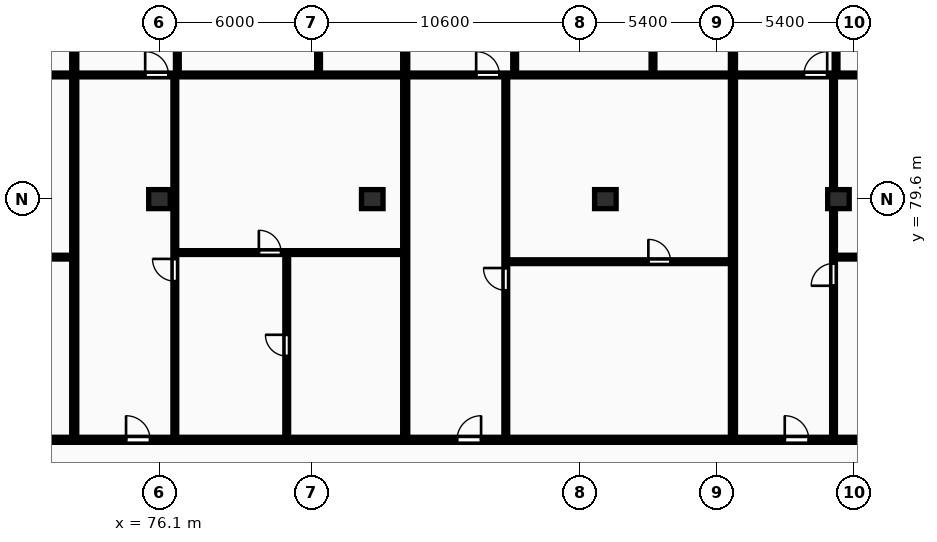
"""IFC4 building model, lengths in metres.
Left out: names, types, materials, properties, quantities, classifications, styles, units other than length and angle.
Written with IfcOpenShell. Run it as: python <this file> out.ifc"""

import sys

from ifc_helpers import new_model, si_unit, direction, frame, frame_2d, origin, origin_2d, place, context, subcontext, project, spatial, rectangle, extrude, element, fill, save


model = new_model("IFC4")
c1 = context("Model", 3, precision=1e-05, world=origin(), true_north=direction((0.0, 1.0)))
c2 = subcontext(c1, "Body", "Model", "MODEL_VIEW")
j1 = project(units=[si_unit("LENGTHUNIT", "METRE"), si_unit("PLANEANGLEUNIT", "RADIAN")], contexts=[c1])
p1 = place(None, origin())
s1 = spatial("IfcSite", under=j1, at=p1, CompositionType="ELEMENT")
p2 = place(p1, origin())
s2 = spatial("IfcBuilding", under=s1, at=p2, CompositionType="ELEMENT")
p3 = place(p2, frame((0.0, 0.0, 210.85)))
s3 = spatial("IfcBuildingStorey", under=s2, at=p3, CompositionType="ELEMENT", Elevation=210.85)
for number, where, z_axis, x_axis in (
    (1, (76.1, 79.6, 0.0), (0.0, 0.0, 1.0), (1.0, 0.0, 0.0)),
    (2, (84.5, 79.6, 0.0), (0.0, 0.0, 1.0), (1.0, 0.0, 0.0)),
    (3, (93.7, 79.6, 0.0), (0.0, 0.0, 1.0), (1.0, 0.0, 0.0)),
    (4, (102.9, 79.6, 0.0), (0.0, 0.0, 1.0), (1.0, 0.0, 0.0)),
):
    element("IfcColumn", number, at=place(p3, frame(where, z_axis=z_axis, x_axis=x_axis)), inside=s3, PredefinedType="COLUMN", context=c2, shape_type="SweptSolid", body=[
        extrude(rectangle(XDim=0.85, YDim=0.75, at=origin_2d()), origin(), (0.0, 0.0, 1.0), 3.25),
    ])
p4 = place(p3, frame((72.736, 70.18, 0.0), z_axis=(0.0, 0.0, 1.0), x_axis=(0.0, 1.0, 0.0)))
e5 = element("IfcWall", 5, at=p4, inside=s3, PredefinedType="PARTITIONING", context=c2, shape_type="SweptSolid", body=[
    extrude(rectangle(XDim=24.32, YDim=0.2, at=frame_2d((12.16, 0.0))), origin(), (0.0, 0.0, 1.0), 2.97),
])
p5 = place(p3, frame((63.83, 77.31, 0.0), z_axis=(0.0, 0.0, 1.0), x_axis=(1.0, 0.0, 0.0)))
e6 = element("IfcWall", 6, at=p5, inside=s3, PredefinedType="PARTITIONING", context=c2, shape_type="SweptSolid", body=[
    extrude(rectangle(XDim=8.826, YDim=0.15, at=frame_2d((4.413, 0.0))), origin(), (0.0, 0.0, 1.0), 2.97),
])
p6 = place(p5, frame((5.857, 0.0, 0.0)))
e7 = element("IfcOpeningElement", 7, at=p6, cuts=e6, PredefinedType="OPENING", context=c2, shape_type="SweptSolid", body=[
    extrude(rectangle(XDim=0.88, YDim=2.06, at=frame_2d((0.44, 1.03))), frame((0.0, 0.085, 0.0), z_axis=(0.0, -1.0, 0.0), x_axis=(1.0, 0.0, 0.0)), (0.0, 0.0, 1.0), 0.17),
])
p7 = place(p3, frame((59.88, 84.5, 0.0), z_axis=(0.0, 0.0, 1.0), x_axis=(1.0, 0.0, 0.0)))
e8 = element("IfcWall", 8, at=p7, inside=s3, PredefinedType="PARTITIONING", context=c2, shape_type="SweptSolid", body=[
    extrude(rectangle(XDim=12.776, YDim=0.15, at=frame_2d((6.388, 0.0))), origin(), (0.0, 0.0, 1.0), 2.97),
])
p8 = place(p7, frame((2.72, 0.0, 0.0)))
e9 = element("IfcOpeningElement", 9, at=p8, cuts=e8, PredefinedType="OPENING", context=c2, shape_type="SweptSolid", body=[
    extrude(rectangle(XDim=0.92, YDim=2.08, at=frame_2d((0.46, 1.04))), frame((0.0, 0.085, 0.0), z_axis=(0.0, -1.0, 0.0), x_axis=(1.0, 0.0, 0.0)), (0.0, 0.0, 1.0), 0.17),
])
p9 = place(p3, frame((85.8, 70.18, 0.0), z_axis=(0.0, 0.0, 1.0), x_axis=(0.0, 1.0, 0.0)))
e10 = element("IfcWall", 10, at=p9, inside=s3, PredefinedType="PARTITIONING", context=c2, shape_type="SweptSolid", body=[
    extrude(rectangle(XDim=24.32, YDim=0.2, at=frame_2d((12.16, 0.0))), origin(), (0.0, 0.0, 1.0), 2.97),
])
p10 = place(p3, frame((81.123, 70.16, 0.0), z_axis=(0.0, 0.0, 1.0), x_axis=(0.0, 1.0, 0.0)))
e11 = element("IfcWall", 11, at=p10, inside=s3, PredefinedType="PARTITIONING", context=c2, shape_type="SweptSolid", body=[
    extrude(rectangle(XDim=7.33, YDim=0.15, at=frame_2d((3.665, 0.0))), origin(), (0.0, 0.0, 1.0), 2.97),
])
p11 = place(p10, frame((3.245, 0.0, 0.0)))
e12 = element("IfcOpeningElement", 12, at=p11, cuts=e11, PredefinedType="OPENING", context=c2, shape_type="SweptSolid", body=[
    extrude(rectangle(XDim=0.84, YDim=2.04, at=frame_2d((0.42, 1.02))), frame((0.0, 0.085, 0.0), z_axis=(0.0, -1.0, 0.0), x_axis=(1.0, 0.0, 0.0)), (0.0, 0.0, 1.0), 0.17),
])
p12 = place(p3, frame((76.766, 77.49, 0.0), z_axis=(0.0, 0.0, 1.0), x_axis=(1.0, 0.0, 0.0)))
e13 = element("IfcWall", 13, at=p12, inside=s3, PredefinedType="PARTITIONING", context=c2, shape_type="SweptSolid", body=[
    extrude(rectangle(XDim=8.954, YDim=0.15, at=frame_2d((4.477, 0.0))), origin(), (0.0, 0.0, 1.0), 2.97),
])
p13 = place(p12, frame((3.257, 0.0, 0.0)))
e14 = element("IfcOpeningElement", 14, at=p13, cuts=e13, PredefinedType="OPENING", context=c2, shape_type="SweptSolid", body=[
    extrude(rectangle(XDim=0.88, YDim=2.06, at=frame_2d((0.44, 1.03))), frame((0.0, 0.085, 0.0), z_axis=(0.0, -1.0, 0.0), x_axis=(1.0, 0.0, 0.0)), (0.0, 0.0, 1.0), 0.17),
])
p14 = place(p3, frame((76.706, 70.16, 0.0), z_axis=(0.0, 0.0, 1.0), x_axis=(0.0, 1.0, 0.0)))
e15 = element("IfcWall", 15, at=p14, inside=s3, PredefinedType="PARTITIONING", context=c2, shape_type="SweptSolid", body=[
    extrude(rectangle(XDim=14.3, YDim=0.15, at=frame_2d((7.15, 0.0))), origin(), (0.0, 0.0, 1.0), 2.97),
])
p15 = place(p14, frame((6.2, 0.0, 0.0)))
e16 = element("IfcOpeningElement", 16, at=p15, cuts=e15, PredefinedType="OPENING", context=c2, shape_type="SweptSolid", body=[
    extrude(rectangle(XDim=0.88, YDim=2.06, at=frame_2d((0.44, 1.03))), frame((0.0, 0.085, 0.0), z_axis=(0.0, -1.0, 0.0), x_axis=(1.0, 0.0, 0.0)), (0.0, 0.0, 1.0), 0.17),
])
p16 = place(p3, frame((76.806, 84.54, 0.0), z_axis=(0.0, 0.0, 1.0), x_axis=(0.0, 1.0, 0.0)))
e17 = element("IfcWall", 17, at=p16, inside=s3, PredefinedType="PARTITIONING", context=c2, shape_type="SweptSolid", body=[
    extrude(rectangle(XDim=5.0, YDim=0.15, at=frame_2d((2.5, 0.0))), origin(), (0.0, 0.0, 1.0), 2.97),
])
p17 = place(p16, frame((2.06, 0.0, 0.0)))
e18 = element("IfcOpeningElement", 18, at=p17, cuts=e17, PredefinedType="OPENING", context=c2, shape_type="SweptSolid", body=[
    extrude(rectangle(XDim=0.88, YDim=2.06, at=frame_2d((0.44, 1.03))), frame((0.0, 0.085, 0.0), z_axis=(0.0, -1.0, 0.0), x_axis=(1.0, 0.0, 0.0)), (0.0, 0.0, 1.0), 0.17),
])
p18 = place(p3, frame((82.38, 84.54, 0.0), z_axis=(0.0, 0.0, 1.0), x_axis=(0.0, 1.0, 0.0)))
e19 = element("IfcWall", 19, at=p18, inside=s3, PredefinedType="PARTITIONING", context=c2, shape_type="SweptSolid", body=[
    extrude(rectangle(XDim=9.96, YDim=0.15, at=frame_2d((4.98, 0.0))), origin(), (0.0, 0.0, 1.0), 2.97),
])
p19 = place(p18, frame((1.43, 0.0, 0.0)))
e20 = element("IfcOpeningElement", 20, at=p19, cuts=e19, PredefinedType="OPENING", context=c2, shape_type="SweptSolid", body=[
    extrude(rectangle(XDim=0.84, YDim=2.04, at=frame_2d((0.42, 1.02))), frame((0.0, 0.085, 0.0), z_axis=(0.0, -1.0, 0.0), x_axis=(1.0, 0.0, 0.0)), (0.0, 0.0, 1.0), 0.17),
])
p20 = place(p18, frame((3.92, 0.0, 0.0)))
e21 = element("IfcOpeningElement", 21, at=p20, cuts=e19, PredefinedType="OPENING", context=c2, shape_type="SweptSolid", body=[
    extrude(rectangle(XDim=0.84, YDim=2.04, at=frame_2d((0.42, 1.02))), frame((0.0, 0.085, 0.0), z_axis=(0.0, -1.0, 0.0), x_axis=(1.0, 0.0, 0.0)), (0.0, 0.0, 1.0), 0.17),
])
p21 = place(p18, frame((8.297, 0.0, 0.0)))
e22 = element("IfcOpeningElement", 22, at=p21, cuts=e19, PredefinedType="OPENING", context=c2, shape_type="SweptSolid", body=[
    extrude(rectangle(XDim=0.88, YDim=2.06, at=frame_2d((0.44, 1.03))), frame((0.0, 0.085, 0.0), z_axis=(0.0, -1.0, 0.0), x_axis=(1.0, 0.0, 0.0)), (0.0, 0.0, 1.0), 0.17),
])
p22 = place(p3, frame((72.816, 84.5, 0.0), z_axis=(0.0, 0.0, 1.0), x_axis=(1.0, 0.0, 0.0)))
e23 = element("IfcWall", 23, at=p22, inside=s3, PredefinedType="PARTITIONING", context=c2, shape_type="SweptSolid", body=[
    extrude(rectangle(XDim=12.904, YDim=0.15, at=frame_2d((6.452, 0.0))), origin(), (0.0, 0.0, 1.0), 2.97),
])
p23 = place(p22, frame((2.72, 0.0, 0.0)))
e24 = element("IfcOpeningElement", 24, at=p23, cuts=e23, PredefinedType="OPENING", context=c2, shape_type="SweptSolid", body=[
    extrude(rectangle(XDim=0.92, YDim=2.08, at=frame_2d((0.46, 1.04))), frame((0.0, 0.085, 0.0), z_axis=(0.0, -1.0, 0.0), x_axis=(1.0, 0.0, 0.0)), (0.0, 0.0, 1.0), 0.17),
])
p24 = place(p3, frame((98.736, 70.18, 0.0), z_axis=(0.0, 0.0, 1.0), x_axis=(0.0, 1.0, 0.0)))
e25 = element("IfcWall", 25, at=p24, inside=s3, PredefinedType="PARTITIONING", context=c2, shape_type="SweptSolid", body=[
    extrude(rectangle(XDim=24.32, YDim=0.2, at=frame_2d((12.16, 0.0))), origin(), (0.0, 0.0, 1.0), 2.97),
])
p25 = place(p3, frame((89.83, 77.13, 0.0), z_axis=(0.0, 0.0, 1.0), x_axis=(1.0, 0.0, 0.0)))
e26 = element("IfcWall", 26, at=p25, inside=s3, PredefinedType="PARTITIONING", context=c2, shape_type="SweptSolid", body=[
    extrude(rectangle(XDim=8.826, YDim=0.15, at=frame_2d((4.413, 0.0))), origin(), (0.0, 0.0, 1.0), 2.97),
])
p26 = place(p25, frame((5.567, 0.0, 0.0)))
e27 = element("IfcOpeningElement", 27, at=p26, cuts=e26, PredefinedType="OPENING", context=c2, shape_type="SweptSolid", body=[
    extrude(rectangle(XDim=0.88, YDim=2.06, at=frame_2d((0.44, 1.03))), frame((0.0, 0.085, 0.0), z_axis=(0.0, -1.0, 0.0), x_axis=(1.0, 0.0, 0.0)), (0.0, 0.0, 1.0), 0.17),
])
p27 = place(p3, frame((89.77, 70.16, 0.0), z_axis=(0.0, 0.0, 1.0), x_axis=(0.0, 1.0, 0.0)))
e28 = element("IfcWall", 28, at=p27, inside=s3, PredefinedType="PARTITIONING", context=c2, shape_type="SweptSolid", body=[
    extrude(rectangle(XDim=14.3, YDim=0.15, at=frame_2d((7.15, 0.0))), origin(), (0.0, 0.0, 1.0), 2.97),
])
p28 = place(p27, frame((5.84, 0.0, 0.0)))
e29 = element("IfcOpeningElement", 29, at=p28, cuts=e28, PredefinedType="OPENING", context=c2, shape_type="SweptSolid", body=[
    extrude(rectangle(XDim=0.88, YDim=2.06, at=frame_2d((0.44, 1.03))), frame((0.0, 0.085, 0.0), z_axis=(0.0, -1.0, 0.0), x_axis=(1.0, 0.0, 0.0)), (0.0, 0.0, 1.0), 0.17),
])
p29 = place(p3, frame((90.12, 84.54, 0.0), z_axis=(0.0, 0.0, 1.0), x_axis=(0.0, 1.0, 0.0)))
e30 = element("IfcWall", 30, at=p29, inside=s3, PredefinedType="PARTITIONING", context=c2, shape_type="SweptSolid", body=[
    extrude(rectangle(XDim=5.0, YDim=0.15, at=frame_2d((2.5, 0.0))), origin(), (0.0, 0.0, 1.0), 2.97),
])
p30 = place(p29, frame((2.06, 0.0, 0.0)))
e31 = element("IfcOpeningElement", 31, at=p30, cuts=e30, PredefinedType="OPENING", context=c2, shape_type="SweptSolid", body=[
    extrude(rectangle(XDim=0.88, YDim=2.06, at=frame_2d((0.44, 1.03))), frame((0.0, 0.085, 0.0), z_axis=(0.0, -1.0, 0.0), x_axis=(1.0, 0.0, 0.0)), (0.0, 0.0, 1.0), 0.17),
])
p31 = place(p3, frame((95.58, 84.54, 0.0), z_axis=(0.0, 0.0, 1.0), x_axis=(0.0, 1.0, 0.0)))
e32 = element("IfcWall", 32, at=p31, inside=s3, PredefinedType="PARTITIONING", context=c2, shape_type="SweptSolid", body=[
    extrude(rectangle(XDim=9.96, YDim=0.15, at=frame_2d((4.98, 0.0))), origin(), (0.0, 0.0, 1.0), 2.97),
])
p32 = place(p31, frame((1.43, 0.0, 0.0)))
e33 = element("IfcOpeningElement", 33, at=p32, cuts=e32, PredefinedType="OPENING", context=c2, shape_type="SweptSolid", body=[
    extrude(rectangle(XDim=0.84, YDim=2.04, at=frame_2d((0.42, 1.02))), frame((0.0, 0.085, 0.0), z_axis=(0.0, -1.0, 0.0), x_axis=(1.0, 0.0, 0.0)), (0.0, 0.0, 1.0), 0.17),
])
p33 = place(p31, frame((3.92, 0.0, 0.0)))
e34 = element("IfcOpeningElement", 34, at=p33, cuts=e32, PredefinedType="OPENING", context=c2, shape_type="SweptSolid", body=[
    extrude(rectangle(XDim=0.84, YDim=2.04, at=frame_2d((0.42, 1.02))), frame((0.0, 0.085, 0.0), z_axis=(0.0, -1.0, 0.0), x_axis=(1.0, 0.0, 0.0)), (0.0, 0.0, 1.0), 0.17),
])
p34 = place(p31, frame((8.297, 0.0, 0.0)))
e35 = element("IfcOpeningElement", 35, at=p34, cuts=e32, PredefinedType="OPENING", context=c2, shape_type="SweptSolid", body=[
    extrude(rectangle(XDim=0.88, YDim=2.06, at=frame_2d((0.44, 1.03))), frame((0.0, 0.085, 0.0), z_axis=(0.0, -1.0, 0.0), x_axis=(1.0, 0.0, 0.0)), (0.0, 0.0, 1.0), 0.17),
])
p35 = place(p3, frame((85.88, 84.5, 0.0), z_axis=(0.0, 0.0, 1.0), x_axis=(1.0, 0.0, 0.0)))
e36 = element("IfcWall", 36, at=p35, inside=s3, PredefinedType="PARTITIONING", context=c2, shape_type="SweptSolid", body=[
    extrude(rectangle(XDim=12.776, YDim=0.15, at=frame_2d((6.388, 0.0))), origin(), (0.0, 0.0, 1.0), 2.97),
])
p36 = place(p35, frame((2.72, 0.0, 0.0)))
e37 = element("IfcOpeningElement", 37, at=p36, cuts=e36, PredefinedType="OPENING", context=c2, shape_type="SweptSolid", body=[
    extrude(rectangle(XDim=0.92, YDim=2.08, at=frame_2d((0.46, 1.04))), frame((0.0, 0.085, 0.0), z_axis=(0.0, -1.0, 0.0), x_axis=(1.0, 0.0, 0.0)), (0.0, 0.0, 1.0), 0.17),
])
p37 = place(p3, frame((102.766, 77.31, 0.0), z_axis=(0.0, 0.0, 1.0), x_axis=(1.0, 0.0, 0.0)))
e38 = element("IfcWall", 38, at=p37, inside=s3, PredefinedType="PARTITIONING", context=c2, shape_type="SweptSolid", body=[
    extrude(rectangle(XDim=8.954, YDim=0.15, at=frame_2d((4.477, 0.0))), origin(), (0.0, 0.0, 1.0), 2.97),
])
p38 = place(p37, frame((3.257, 0.0, 0.0)))
e39 = element("IfcOpeningElement", 39, at=p38, cuts=e38, PredefinedType="OPENING", context=c2, shape_type="SweptSolid", body=[
    extrude(rectangle(XDim=0.88, YDim=2.06, at=frame_2d((0.44, 1.03))), frame((0.0, 0.085, 0.0), z_axis=(0.0, -1.0, 0.0), x_axis=(1.0, 0.0, 0.0)), (0.0, 0.0, 1.0), 0.17),
])
p39 = place(p3, frame((102.706, 70.16, 0.0), z_axis=(0.0, 0.0, 1.0), x_axis=(0.0, 1.0, 0.0)))
e40 = element("IfcWall", 40, at=p39, inside=s3, PredefinedType="PARTITIONING", context=c2, shape_type="SweptSolid", body=[
    extrude(rectangle(XDim=14.3, YDim=0.15, at=frame_2d((7.15, 0.0))), origin(), (0.0, 0.0, 1.0), 2.277),
])
p40 = place(p39, frame((6.02, 0.0, 0.0)))
e41 = element("IfcOpeningElement", 41, at=p40, cuts=e40, PredefinedType="OPENING", context=c2, shape_type="SweptSolid", body=[
    extrude(rectangle(XDim=0.88, YDim=2.06, at=frame_2d((0.44, 1.03))), frame((0.0, 0.085, 0.0), z_axis=(0.0, -1.0, 0.0), x_axis=(1.0, 0.0, 0.0)), (0.0, 0.0, 1.0), 0.17),
])
p41 = place(p3, frame((102.806, 84.54, 0.0), z_axis=(0.0, 0.0, 1.0), x_axis=(0.0, 1.0, 0.0)))
e42 = element("IfcWall", 42, at=p41, inside=s3, PredefinedType="PARTITIONING", context=c2, shape_type="SweptSolid", body=[
    extrude(rectangle(XDim=5.0, YDim=0.15, at=frame_2d((2.5, 0.0))), origin(), (0.0, 0.0, 1.0), 2.277),
])
p42 = place(p41, frame((2.06, 0.0, 0.0)))
e43 = element("IfcOpeningElement", 43, at=p42, cuts=e42, PredefinedType="OPENING", context=c2, shape_type="SweptSolid", body=[
    extrude(rectangle(XDim=0.88, YDim=2.06, at=frame_2d((0.44, 1.03))), frame((0.0, 0.085, 0.0), z_axis=(0.0, -1.0, 0.0), x_axis=(1.0, 0.0, 0.0)), (0.0, 0.0, 1.0), 0.17),
])
p43 = place(p3, frame((98.816, 84.5, 0.0), z_axis=(0.0, 0.0, 1.0), x_axis=(1.0, 0.0, 0.0)))
e44 = element("IfcWall", 44, at=p43, inside=s3, PredefinedType="PARTITIONING", context=c2, shape_type="SweptSolid", body=[
    extrude(rectangle(XDim=12.904, YDim=0.15, at=frame_2d((6.452, 0.0))), origin(), (0.0, 0.0, 1.0), 2.97),
])
p44 = place(p43, frame((2.72, 0.0, 0.0)))
e45 = element("IfcOpeningElement", 45, at=p44, cuts=e44, PredefinedType="OPENING", context=c2, shape_type="SweptSolid", body=[
    extrude(rectangle(XDim=0.92, YDim=2.08, at=frame_2d((0.46, 1.04))), frame((0.0, 0.085, 0.0), z_axis=(0.0, -1.0, 0.0), x_axis=(1.0, 0.0, 0.0)), (0.0, 0.0, 1.0), 0.17),
])
p45 = place(p3, frame((59.8, 70.1, 0.0), z_axis=(0.0, 0.0, 1.0), x_axis=(1.0, 0.0, 0.0)))
e46 = element("IfcWall", 46, at=p45, inside=s3, PredefinedType="PARTITIONING", context=c2, shape_type="SweptSolid", body=[
    extrude(rectangle(XDim=68.6, YDim=0.2, at=frame_2d((34.3, 0.0))), origin(), (0.0, 0.0, 1.0), 2.97),
])
p46 = place(p45, frame((2.045, 0.0, 0.0)))
e47 = element("IfcOpeningElement", 47, at=p46, cuts=e46, PredefinedType="OPENING", context=c2, shape_type="SweptSolid", body=[
    extrude(rectangle(XDim=0.95, YDim=2.15, at=frame_2d((0.475, 1.075))), frame((0.0, 0.11, 0.0), z_axis=(0.0, -1.0, 0.0), x_axis=(1.0, 0.0, 0.0)), (0.0, 0.0, 1.0), 0.22),
])
p47 = place(p45, frame((14.981, 0.0, 0.0)))
e48 = element("IfcOpeningElement", 48, at=p47, cuts=e46, PredefinedType="OPENING", context=c2, shape_type="SweptSolid", body=[
    extrude(rectangle(XDim=0.95, YDim=2.15, at=frame_2d((0.475, 1.075))), frame((0.0, 0.11, 0.0), z_axis=(0.0, -1.0, 0.0), x_axis=(1.0, 0.0, 0.0)), (0.0, 0.0, 1.0), 0.22),
])
p48 = place(p45, frame((28.045, 0.0, 0.0)))
e49 = element("IfcOpeningElement", 49, at=p48, cuts=e46, PredefinedType="OPENING", context=c2, shape_type="SweptSolid", body=[
    extrude(rectangle(XDim=0.95, YDim=2.15, at=frame_2d((0.475, 1.075))), frame((0.0, 0.11, 0.0), z_axis=(0.0, -1.0, 0.0), x_axis=(1.0, 0.0, 0.0)), (0.0, 0.0, 1.0), 0.22),
])
p49 = place(p45, frame((40.981, 0.0, 0.0)))
e50 = element("IfcOpeningElement", 50, at=p49, cuts=e46, PredefinedType="OPENING", context=c2, shape_type="SweptSolid", body=[
    extrude(rectangle(XDim=0.95, YDim=2.15, at=frame_2d((0.475, 1.075))), frame((0.0, 0.11, 0.0), z_axis=(0.0, -1.0, 0.0), x_axis=(1.0, 0.0, 0.0)), (0.0, 0.0, 1.0), 0.22),
])
p50 = place(p45, frame((54.045, 0.0, 0.0)))
e51 = element("IfcOpeningElement", 51, at=p50, cuts=e46, PredefinedType="OPENING", context=c2, shape_type="SweptSolid", body=[
    extrude(rectangle(XDim=0.95, YDim=2.15, at=frame_2d((0.475, 1.075))), frame((0.0, 0.11, 0.0), z_axis=(0.0, -1.0, 0.0), x_axis=(1.0, 0.0, 0.0)), (0.0, 0.0, 1.0), 0.22),
])
p51 = place(p11, origin())
e52 = element("IfcDoor", 52, at=p51, inside=s3, OperationType="SINGLE_SWING_RIGHT", PredefinedType="DOOR", context=c2, shape_type="SweptSolid", body=[
    extrude(rectangle(XDim=0.84, YDim=2.04, at=frame_2d((0.42, 1.02))), frame((0.0, 0.025, 0.0), z_axis=(0.0, -1.0, 0.0), x_axis=(1.0, 0.0, 0.0)), (0.0, 0.0, 1.0), 0.05),
])
fill(e12, e52)
p52 = place(p13, origin())
e53 = element("IfcDoor", 53, at=p52, inside=s3, OperationType="SINGLE_SWING_LEFT", PredefinedType="DOOR", context=c2, shape_type="SweptSolid", body=[
    extrude(rectangle(XDim=0.88, YDim=2.06, at=frame_2d((0.44, 1.03))), frame((0.0, 0.025, 0.0), z_axis=(0.0, -1.0, 0.0), x_axis=(1.0, 0.0, 0.0)), (0.0, 0.0, 1.0), 0.05),
])
fill(e14, e53)
p53 = place(p15, origin())
e54 = element("IfcDoor", 54, at=p53, inside=s3, OperationType="SINGLE_SWING_RIGHT", PredefinedType="DOOR", context=c2, shape_type="SweptSolid", body=[
    extrude(rectangle(XDim=0.88, YDim=2.06, at=frame_2d((0.44, 1.03))), frame((0.0, 0.025, 0.0), z_axis=(0.0, -1.0, 0.0), x_axis=(1.0, 0.0, 0.0)), (0.0, 0.0, 1.0), 0.05),
])
fill(e16, e54)
p54 = place(p23, origin())
e55 = element("IfcDoor", 55, at=p54, inside=s3, OperationType="SINGLE_SWING_LEFT", PredefinedType="DOOR", context=c2, shape_type="SweptSolid", body=[
    extrude(rectangle(XDim=0.92, YDim=2.08, at=frame_2d((0.46, 1.04))), frame((0.0, 0.025, 0.0), z_axis=(0.0, -1.0, 0.0), x_axis=(1.0, 0.0, 0.0)), (0.0, 0.0, 1.0), 0.05),
])
fill(e24, e55)
p55 = place(p26, origin())
e56 = element("IfcDoor", 56, at=p55, inside=s3, OperationType="SINGLE_SWING_LEFT", PredefinedType="DOOR", context=c2, shape_type="SweptSolid", body=[
    extrude(rectangle(XDim=0.88, YDim=2.06, at=frame_2d((0.44, 1.03))), frame((0.0, 0.025, 0.0), z_axis=(0.0, -1.0, 0.0), x_axis=(1.0, 0.0, 0.0)), (0.0, 0.0, 1.0), 0.05),
])
fill(e27, e56)
p56 = place(p28, origin())
e57 = element("IfcDoor", 57, at=p56, inside=s3, OperationType="SINGLE_SWING_RIGHT", PredefinedType="DOOR", context=c2, shape_type="SweptSolid", body=[
    extrude(rectangle(XDim=0.88, YDim=2.06, at=frame_2d((0.44, 1.03))), frame((0.0, 0.025, 0.0), z_axis=(0.0, -1.0, 0.0), x_axis=(1.0, 0.0, 0.0)), (0.0, 0.0, 1.0), 0.05),
])
fill(e29, e57)
p57 = place(p36, origin())
e58 = element("IfcDoor", 58, at=p57, inside=s3, OperationType="SINGLE_SWING_LEFT", PredefinedType="DOOR", context=c2, shape_type="SweptSolid", body=[
    extrude(rectangle(XDim=0.92, YDim=2.08, at=frame_2d((0.46, 1.04))), frame((0.0, 0.025, 0.0), z_axis=(0.0, -1.0, 0.0), x_axis=(1.0, 0.0, 0.0)), (0.0, 0.0, 1.0), 0.05),
])
fill(e37, e58)
p58 = place(p40, origin())
e59 = element("IfcDoor", 59, at=p58, inside=s3, OperationType="SINGLE_SWING_LEFT", PredefinedType="DOOR", context=c2, shape_type="SweptSolid", body=[
    extrude(rectangle(XDim=0.88, YDim=2.06, at=frame_2d((0.44, 1.03))), frame((0.0, 0.025, 0.0), z_axis=(0.0, -1.0, 0.0), x_axis=(1.0, 0.0, 0.0)), (0.0, 0.0, 1.0), 0.05),
])
fill(e41, e59)
p59 = place(p44, origin())
e60 = element("IfcDoor", 60, at=p59, inside=s3, OperationType="SINGLE_SWING_RIGHT", PredefinedType="DOOR", context=c2, shape_type="SweptSolid", body=[
    extrude(rectangle(XDim=0.92, YDim=2.08, at=frame_2d((0.46, 1.04))), frame((0.0, 0.025, 0.0), z_axis=(0.0, -1.0, 0.0), x_axis=(1.0, 0.0, 0.0)), (0.0, 0.0, 1.0), 0.05),
])
fill(e45, e60)
p60 = place(p47, origin())
e61 = element("IfcDoor", 61, at=p60, inside=s3, OperationType="SINGLE_SWING_LEFT", PredefinedType="DOOR", context=c2, shape_type="SweptSolid", body=[
    extrude(rectangle(XDim=0.95, YDim=2.15, at=frame_2d((0.475, 1.075))), frame((0.0, 0.025, 0.0), z_axis=(0.0, -1.0, 0.0), x_axis=(1.0, 0.0, 0.0)), (0.0, 0.0, 1.0), 0.05),
])
fill(e48, e61)
p61 = place(p48, origin())
e62 = element("IfcDoor", 62, at=p61, inside=s3, OperationType="SINGLE_SWING_RIGHT", PredefinedType="DOOR", context=c2, shape_type="SweptSolid", body=[
    extrude(rectangle(XDim=0.95, YDim=2.15, at=frame_2d((0.475, 1.075))), frame((0.0, 0.025, 0.0), z_axis=(0.0, -1.0, 0.0), x_axis=(1.0, 0.0, 0.0)), (0.0, 0.0, 1.0), 0.05),
])
fill(e49, e62)
p62 = place(p49, origin())
e63 = element("IfcDoor", 63, at=p62, inside=s3, OperationType="SINGLE_SWING_LEFT", PredefinedType="DOOR", context=c2, shape_type="SweptSolid", body=[
    extrude(rectangle(XDim=0.95, YDim=2.15, at=frame_2d((0.475, 1.075))), frame((0.0, 0.025, 0.0), z_axis=(0.0, -1.0, 0.0), x_axis=(1.0, 0.0, 0.0)), (0.0, 0.0, 1.0), 0.05),
])
fill(e50, e63)
save(model, sys.argv[1])
